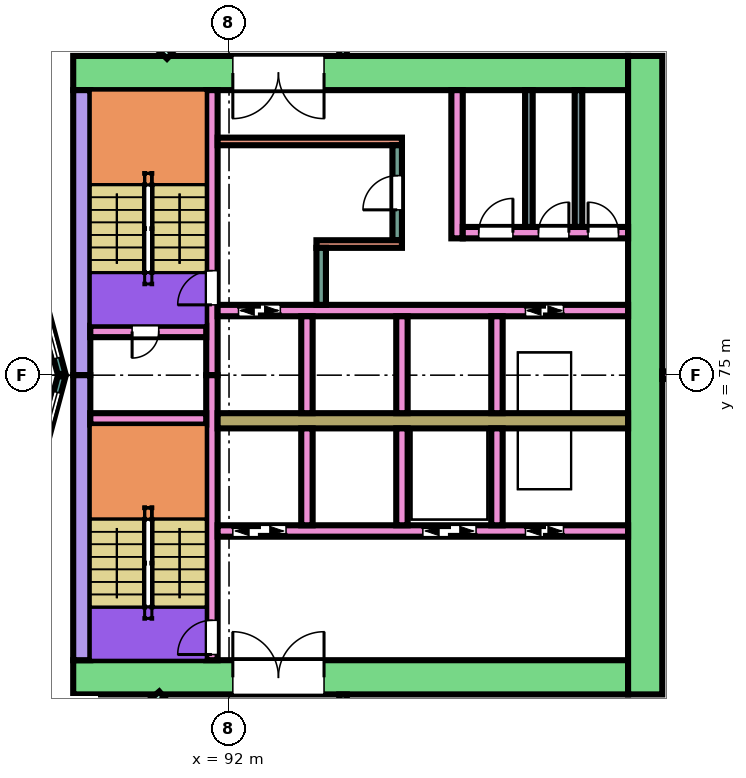
"""IFC4 building model, lengths in metres.
Left out: names, types, materials, properties, quantities, classifications, styles, units other than length and angle.
Written with IfcOpenShell. Run it as: python <this file> out.ifc"""

import sys

from ifc_helpers import new_model, si_unit, direction, frame, frame_2d, origin, place, context, subcontext, project, spatial, rectangle, extrude, element, fill, save


model = new_model("IFC4")
c1 = context("Model", 3, precision=1e-05, world=origin(), true_north=direction((0.0, 1.0)))
c2 = subcontext(c1, "Body", "Model", "MODEL_VIEW")
j1 = project(units=[si_unit("LENGTHUNIT", "METRE"), si_unit("PLANEANGLEUNIT", "RADIAN")], contexts=[c1])
p1 = place(None, origin())
s1 = spatial("IfcSite", under=j1, at=p1, CompositionType="ELEMENT")
p2 = place(p1, origin())
s2 = spatial("IfcBuilding", under=s1, at=p2, CompositionType="ELEMENT")
p3 = place(p2, frame((0.0, 0.0, 7.0)))
s3 = spatial("IfcBuildingStorey", under=s2, at=p3, CompositionType="ELEMENT", Elevation=7.0)
p4 = place(p3, frame((87.9, 82.95, 0.0), z_axis=(0.0, 0.0, 1.0), x_axis=(1.0, 0.0, 0.0)))
e1 = element("IfcWall", 1, at=p4, inside=s3, PredefinedType="SHEAR", context=c2, shape_type="SweptSolid", body=[
    extrude(rectangle(XDim=14.6, YDim=0.9, at=frame_2d((7.3, 0.0))), origin(), (0.0, 0.0, 1.0), 4.95),
])
p5 = place(p4, frame((4.2, 0.0, 0.0)))
e2 = element("IfcOpeningElement", 2, at=p5, cuts=e1, PredefinedType="OPENING", context=c2, shape_type="SweptSolid", body=[
    extrude(rectangle(XDim=2.4, YDim=2.4, at=frame_2d((1.2, 1.2))), frame((0.0, 0.46, 0.0), z_axis=(0.0, -1.0, 0.0), x_axis=(1.0, 0.0, 0.0)), (0.0, 0.0, 1.0), 0.92),
])
p6 = place(p3, frame((87.9, 67.05, 0.0), z_axis=(0.0, 0.0, 1.0), x_axis=(1.0, 0.0, 0.0)))
e3 = element("IfcWall", 3, at=p6, inside=s3, PredefinedType="SHEAR", context=c2, shape_type="SweptSolid", body=[
    extrude(rectangle(XDim=14.6, YDim=0.9, at=frame_2d((7.3, 0.0))), origin(), (0.0, 0.0, 1.0), 4.95),
])
p7 = place(p6, frame((4.2, 0.0, 0.0)))
e4 = element("IfcOpeningElement", 4, at=p7, cuts=e3, PredefinedType="OPENING", context=c2, shape_type="SweptSolid", body=[
    extrude(rectangle(XDim=2.4, YDim=2.4, at=frame_2d((1.2, 1.2))), frame((0.0, 0.46, 0.0), z_axis=(0.0, -1.0, 0.0), x_axis=(1.0, 0.0, 0.0)), (0.0, 0.0, 1.0), 0.92),
])
for number, where, z_axis, x_axis in (
    (5, (88.125, 75.0, 0.0), (0.0, 0.0, 1.0), (0.0, 1.0, 0.0)),
    (6, (88.125, 67.5, 0.0), (0.0, 0.0, 1.0), (0.0, 1.0, 0.0)),
):
    element("IfcWall", number, at=place(p3, frame(where, z_axis=z_axis, x_axis=x_axis)), inside=s3, PredefinedType="SHEAR", context=c2, shape_type="SweptSolid", body=[
        extrude(rectangle(XDim=7.5, YDim=0.45, at=frame_2d((3.75, 0.0))), origin(), (0.0, 0.0, 1.0), 4.95),
    ])
p8 = place(p3, frame((102.95, 66.6, 0.0), z_axis=(0.0, 0.0, 1.0), x_axis=(0.0, 1.0, 0.0)))
e7 = element("IfcWall", 7, at=p8, inside=s3, PredefinedType="SHEAR", context=c2, shape_type="SweptSolid", body=[
    extrude(rectangle(XDim=16.8, YDim=0.9, at=frame_2d((8.4, 0.0))), origin(), (0.0, 0.0, 1.0), 4.95),
])
p9 = place(p3, frame((91.55, 75.0, 0.0), z_axis=(0.0, 0.0, 1.0), x_axis=(0.0, 1.0, 0.0)))
e8 = element("IfcWall", 8, at=p9, inside=s3, PredefinedType="SHEAR", context=c2, shape_type="SweptSolid", body=[
    extrude(rectangle(XDim=7.5, YDim=0.3, at=frame_2d((3.75, 0.0))), origin(), (0.0, 0.0, 1.0), 4.95),
])
p10 = place(p9, frame((1.85, 0.0, 0.0)))
e9 = element("IfcOpeningElement", 9, at=p10, cuts=e8, PredefinedType="OPENING", context=c2, shape_type="SweptSolid", body=[
    extrude(rectangle(XDim=0.9, YDim=2.1, at=frame_2d((0.45, 1.05))), frame((0.0, 0.16, 0.0), z_axis=(0.0, -1.0, 0.0), x_axis=(1.0, 0.0, 0.0)), (0.0, 0.0, 1.0), 0.32),
])
p11 = place(p3, frame((91.55, 67.5, 0.0), z_axis=(0.0, 0.0, 1.0), x_axis=(0.0, 1.0, 0.0)))
e10 = element("IfcWall", 10, at=p11, inside=s3, PredefinedType="SHEAR", context=c2, shape_type="SweptSolid", body=[
    extrude(rectangle(XDim=7.5, YDim=0.3, at=frame_2d((3.75, 0.0))), origin(), (0.0, 0.0, 1.0), 4.95),
])
p12 = place(p11, frame((0.15, 0.0, 0.0)))
e11 = element("IfcOpeningElement", 11, at=p12, cuts=e10, PredefinedType="OPENING", context=c2, shape_type="SweptSolid", body=[
    extrude(rectangle(XDim=0.9, YDim=2.1, at=frame_2d((0.45, 1.05))), frame((0.0, 0.16, 0.0), z_axis=(0.0, -1.0, 0.0), x_axis=(1.0, 0.0, 0.0)), (0.0, 0.0, 1.0), 0.32),
])
p13 = place(p3, frame((88.35, 76.15, 0.0), z_axis=(0.0, 0.0, 1.0), x_axis=(1.0, 0.0, 0.0)))
e12 = element("IfcWall", 12, at=p13, inside=s3, PredefinedType="SHEAR", context=c2, shape_type="SweptSolid", body=[
    extrude(rectangle(XDim=3.05, YDim=0.3, at=frame_2d((1.525, 0.0))), origin(), (0.0, 0.0, 1.0), 4.95),
])
p14 = place(p13, frame((1.1, 0.0, 0.0)))
e13 = element("IfcOpeningElement", 13, at=p14, cuts=e12, PredefinedType="OPENING", context=c2, shape_type="SweptSolid", body=[
    extrude(rectangle(XDim=0.7, YDim=2.0, at=frame_2d((0.35, 1.0))), frame((0.0, 0.16, 0.0), z_axis=(0.0, -1.0, 0.0), x_axis=(1.0, 0.0, 0.0)), (0.0, 0.0, 1.0), 0.32),
])
p15 = place(p3, frame((88.35, 73.85, 0.0), z_axis=(0.0, 0.0, 1.0), x_axis=(1.0, 0.0, 0.0)))
e14 = element("IfcWall", 14, at=p15, inside=s3, PredefinedType="SHEAR", context=c2, shape_type="SweptSolid", body=[
    extrude(rectangle(XDim=3.05, YDim=0.3, at=frame_2d((1.525, 0.0))), origin(), (0.0, 0.0, 1.0), 4.95),
])
p16 = place(p3, frame((91.7, 76.7, 0.0), z_axis=(0.0, 0.0, 1.0), x_axis=(1.0, 0.0, 0.0)))
e15 = element("IfcWall", 15, at=p16, inside=s3, PredefinedType="SHEAR", context=c2, shape_type="SweptSolid", body=[
    extrude(rectangle(XDim=10.8, YDim=0.3, at=frame_2d((5.4, 0.0))), origin(), (0.0, 0.0, 1.0), 4.95),
])
p17 = place(p16, frame((0.55, 0.0, 0.0)))
e16 = element("IfcOpeningElement", 16, at=p17, cuts=e15, PredefinedType="OPENING", context=c2, shape_type="SweptSolid", body=[
    extrude(rectangle(XDim=1.1, YDim=2.1, at=frame_2d((0.55, 1.05))), frame((0.0, 0.16, 0.0), z_axis=(0.0, -1.0, 0.0), x_axis=(1.0, 0.0, 0.0)), (0.0, 0.0, 1.0), 0.32),
])
p18 = place(p16, frame((8.1, 0.0, 0.0)))
e17 = element("IfcOpeningElement", 17, at=p18, cuts=e15, PredefinedType="OPENING", context=c2, shape_type="SweptSolid", body=[
    extrude(rectangle(XDim=1.0, YDim=2.1, at=frame_2d((0.5, 1.05))), frame((0.0, 0.16, 0.0), z_axis=(0.0, -1.0, 0.0), x_axis=(1.0, 0.0, 0.0)), (0.0, 0.0, 1.0), 0.32),
])
p19 = place(p3, frame((91.7, 73.8, 0.0), z_axis=(0.0, 0.0, 1.0), x_axis=(1.0, 0.0, 0.0)))
e18 = element("IfcWall", 18, at=p19, inside=s3, PredefinedType="SHEAR", context=c2, shape_type="SweptSolid", body=[
    extrude(rectangle(XDim=10.8, YDim=0.4, at=frame_2d((5.4, 0.0))), origin(), (0.0, 0.0, 1.0), 4.95),
])
p20 = place(p3, frame((91.7, 70.9, 0.0), z_axis=(0.0, 0.0, 1.0), x_axis=(1.0, 0.0, 0.0)))
e19 = element("IfcWall", 19, at=p20, inside=s3, PredefinedType="SHEAR", context=c2, shape_type="SweptSolid", body=[
    extrude(rectangle(XDim=10.8, YDim=0.3, at=frame_2d((5.4, 0.0))), origin(), (0.0, 0.0, 1.0), 4.95),
])
p21 = place(p20, frame((0.4, 0.0, 0.0)))
e20 = element("IfcOpeningElement", 20, at=p21, cuts=e19, PredefinedType="OPENING", context=c2, shape_type="SweptSolid", body=[
    extrude(rectangle(XDim=1.4, YDim=2.1, at=frame_2d((0.7, 1.05))), frame((0.0, 0.16, 0.0), z_axis=(0.0, -1.0, 0.0), x_axis=(1.0, 0.0, 0.0)), (0.0, 0.0, 1.0), 0.32),
])
p22 = place(p20, frame((5.4, 0.0, 0.0)))
e21 = element("IfcOpeningElement", 21, at=p22, cuts=e19, PredefinedType="OPENING", context=c2, shape_type="SweptSolid", body=[
    extrude(rectangle(XDim=1.4, YDim=2.1, at=frame_2d((0.7, 1.05))), frame((0.0, 0.16, 0.0), z_axis=(0.0, -1.0, 0.0), x_axis=(1.0, 0.0, 0.0)), (0.0, 0.0, 1.0), 0.32),
])
p23 = place(p20, frame((8.1, 0.0, 0.0)))
e22 = element("IfcOpeningElement", 22, at=p23, cuts=e19, PredefinedType="OPENING", context=c2, shape_type="SweptSolid", body=[
    extrude(rectangle(XDim=1.0, YDim=2.1, at=frame_2d((0.5, 1.05))), frame((0.0, 0.16, 0.0), z_axis=(0.0, -1.0, 0.0), x_axis=(1.0, 0.0, 0.0)), (0.0, 0.0, 1.0), 0.32),
])
for number, where, z_axis, x_axis in (
    (23, (94.05, 74.0, 0.0), (0.0, 0.0, 1.0), (0.0, 1.0, 0.0)),
    (24, (96.55, 74.0, 0.0), (0.0, 0.0, 1.0), (0.0, 1.0, 0.0)),
    (25, (99.05, 74.0, 0.0), (0.0, 0.0, 1.0), (0.0, 1.0, 0.0)),
    (26, (94.05, 71.05, 0.0), (0.0, 0.0, 1.0), (0.0, 1.0, 0.0)),
    (27, (96.55, 71.05, 0.0), (0.0, 0.0, 1.0), (0.0, 1.0, 0.0)),
    (28, (99.05, 71.05, 0.0), (0.0, 0.0, 1.0), (0.0, 1.0, 0.0)),
):
    element("IfcWall", number, at=place(p3, frame(where, z_axis=z_axis, x_axis=x_axis)), inside=s3, PredefinedType="SHEAR", context=c2, shape_type="SweptSolid", body=[
        extrude(rectangle(XDim=2.55, YDim=0.3, at=frame_2d((1.275, 0.0))), origin(), (0.0, 0.0, 1.0), 4.95),
    ])
p24 = place(p3, frame((91.7, 81.15, 0.0), z_axis=(0.0, 0.0, 1.0), x_axis=(1.0, 0.0, 0.0)))
e29 = element("IfcWall", 29, at=p24, inside=s3, PredefinedType="SHEAR", context=c2, shape_type="SweptSolid", body=[
    extrude(rectangle(XDim=4.85, YDim=0.2, at=frame_2d((2.425, 0.0))), origin(), (0.0, 0.0, 1.0), 4.95),
])
p25 = place(p3, frame((96.425, 78.55, 0.0), z_axis=(0.0, 0.0, 1.0), x_axis=(0.0, 1.0, 0.0)))
e30 = element("IfcWall", 30, at=p25, inside=s3, PredefinedType="SHEAR", context=c2, shape_type="SweptSolid", body=[
    extrude(rectangle(XDim=2.5, YDim=0.25, at=frame_2d((1.25, 0.0))), origin(), (0.0, 0.0, 1.0), 4.95),
])
p26 = place(p25, frame((0.8, 0.0, 0.0)))
e31 = element("IfcOpeningElement", 31, at=p26, cuts=e30, PredefinedType="OPENING", context=c2, shape_type="SweptSolid", body=[
    extrude(rectangle(XDim=0.9, YDim=2.1, at=frame_2d((0.45, 1.05))), frame((0.0, 0.135, 0.0), z_axis=(0.0, -1.0, 0.0), x_axis=(1.0, 0.0, 0.0)), (0.0, 0.0, 1.0), 0.27),
])
p27 = place(p3, frame((94.3, 78.45, 0.0), z_axis=(0.0, 0.0, 1.0), x_axis=(1.0, 0.0, 0.0)))
e32 = element("IfcWall", 32, at=p27, inside=s3, PredefinedType="SHEAR", context=c2, shape_type="SweptSolid", body=[
    extrude(rectangle(XDim=2.25, YDim=0.2, at=frame_2d((1.125, 0.0))), origin(), (0.0, 0.0, 1.0), 4.95),
])
p28 = place(p3, frame((94.425, 76.85, 0.0), z_axis=(0.0, 0.0, 1.0), x_axis=(0.0, 1.0, 0.0)))
e33 = element("IfcWall", 33, at=p28, inside=s3, PredefinedType="SHEAR", context=c2, shape_type="SweptSolid", body=[
    extrude(rectangle(XDim=1.5, YDim=0.25, at=frame_2d((0.75, 0.0))), origin(), (0.0, 0.0, 1.0), 4.95),
])
p29 = place(p3, frame((98.0, 78.6, 0.0), z_axis=(0.0, 0.0, 1.0), x_axis=(0.0, 1.0, 0.0)))
e34 = element("IfcWall", 34, at=p29, inside=s3, PredefinedType="SHEAR", context=c2, shape_type="SweptSolid", body=[
    extrude(rectangle(XDim=3.9, YDim=0.3, at=frame_2d((1.95, 0.0))), origin(), (0.0, 0.0, 1.0), 4.95),
])
p30 = place(p3, frame((98.15, 78.75, 0.0), z_axis=(0.0, 0.0, 1.0), x_axis=(1.0, 0.0, 0.0)))
e35 = element("IfcWall", 35, at=p30, inside=s3, PredefinedType="SHEAR", context=c2, shape_type="SweptSolid", body=[
    extrude(rectangle(XDim=4.35, YDim=0.3, at=frame_2d((2.175, 0.0))), origin(), (0.0, 0.0, 1.0), 4.95),
])
p31 = place(p30, frame((0.42, 0.0, 0.0)))
e36 = element("IfcOpeningElement", 36, at=p31, cuts=e35, PredefinedType="OPENING", context=c2, shape_type="SweptSolid", body=[
    extrude(rectangle(XDim=0.9, YDim=2.1, at=frame_2d((0.45, 1.05))), frame((0.0, 0.16, 0.0), z_axis=(0.0, -1.0, 0.0), x_axis=(1.0, 0.0, 0.0)), (0.0, 0.0, 1.0), 0.32),
])
p32 = place(p30, frame((1.992, 0.0, 0.0)))
e37 = element("IfcOpeningElement", 37, at=p32, cuts=e35, PredefinedType="OPENING", context=c2, shape_type="SweptSolid", body=[
    extrude(rectangle(XDim=0.8, YDim=2.1, at=frame_2d((0.4, 1.05))), frame((0.0, 0.16, 0.0), z_axis=(0.0, -1.0, 0.0), x_axis=(1.0, 0.0, 0.0)), (0.0, 0.0, 1.0), 0.32),
])
p33 = place(p30, frame((3.298, 0.0, 0.0)))
e38 = element("IfcOpeningElement", 38, at=p33, cuts=e35, PredefinedType="OPENING", context=c2, shape_type="SweptSolid", body=[
    extrude(rectangle(XDim=0.8, YDim=2.1, at=frame_2d((0.4, 1.05))), frame((0.0, 0.16, 0.0), z_axis=(0.0, -1.0, 0.0), x_axis=(1.0, 0.0, 0.0)), (0.0, 0.0, 1.0), 0.32),
])
p34 = place(p3, frame((87.604, 75.0, 0.0), z_axis=(0.0, 0.0, 1.0), x_axis=(-0.258789828301, 0.965933654434, 0.0)))
e39 = element("IfcWall", 39, at=p34, inside=s3, PredefinedType="NOTDEFINED", context=c2, shape_type="SweptSolid", body=[
    extrude(rectangle(XDim=3.936, YDim=0.2, at=frame_2d((1.968, 0.0))), origin(), (0.0, 0.0, 1.0), 5.4),
])
p35 = place(p34, frame((0.468, 0.0, 0.9)))
e40 = element("IfcOpeningElement", 40, at=p35, cuts=e39, PredefinedType="OPENING", context=c2, shape_type="SweptSolid", body=[
    extrude(rectangle(XDim=3.0, YDim=2.3, at=frame_2d((1.5, 1.15))), frame((0.0, 0.11, 0.0), z_axis=(0.0, -1.0, 0.0), x_axis=(1.0, 0.0, 0.0)), (0.0, 0.0, 1.0), 0.22),
])
p36 = place(p3, frame((86.585, 71.198, 0.0), z_axis=(0.0, 0.0, 1.0), x_axis=(0.258789828301, 0.965933654434, 0.0)))
e41 = element("IfcWall", 41, at=p36, inside=s3, PredefinedType="NOTDEFINED", context=c2, shape_type="SweptSolid", body=[
    extrude(rectangle(XDim=3.936, YDim=0.2, at=frame_2d((1.968, 0.0))), origin(), (0.0, 0.0, 1.0), 5.4),
])
p37 = place(p36, frame((0.468, 0.0, 0.9)))
e42 = element("IfcOpeningElement", 42, at=p37, cuts=e41, PredefinedType="OPENING", context=c2, shape_type="SweptSolid", body=[
    extrude(rectangle(XDim=3.0, YDim=2.3, at=frame_2d((1.5, 1.15))), frame((0.0, 0.11, 0.0), z_axis=(0.0, -1.0, 0.0), x_axis=(1.0, 0.0, 0.0)), (0.0, 0.0, 1.0), 0.22),
])
p38 = place(p3, frame((86.685, 63.551, 0.0), z_axis=(0.0, 0.0, 1.0), x_axis=(0.758049900748, 0.652196556244, 0.0)))
e43 = element("IfcWall", 43, at=p38, inside=s3, PredefinedType="PARTITIONING", context=c2, shape_type="SweptSolid", body=[
    extrude(rectangle(XDim=4.675, YDim=0.2, at=frame_2d((2.337, 0.0))), origin(), (0.0, 0.0, 1.0), 4.95),
])
p39 = place(p38, frame((1.887, 0.0, 0.0)))
e44 = element("IfcOpeningElement", 44, at=p39, cuts=e43, PredefinedType="OPENING", context=c2, shape_type="SweptSolid", body=[
    extrude(rectangle(XDim=0.9, YDim=2.1, at=frame_2d((0.45, 1.05))), frame((0.0, 0.11, 0.0), z_axis=(0.0, -1.0, 0.0), x_axis=(1.0, 0.0, 0.0)), (0.0, 0.0, 1.0), 0.22),
])
p40 = place(p3, frame((86.861, 86.852, 0.0), z_axis=(0.0, 0.0, 1.0), x_axis=(0.719448855188, -0.694545423114, 0.0)))
e45 = element("IfcWall", 45, at=p40, inside=s3, PredefinedType="PARTITIONING", context=c2, shape_type="SweptSolid", body=[
    extrude(rectangle(XDim=4.97, YDim=0.2, at=frame_2d((2.485, 0.0))), origin(), (0.0, 0.0, 1.0), 4.95),
])
p41 = place(p40, frame((2.035, 0.0, 0.0)))
e46 = element("IfcOpeningElement", 46, at=p41, cuts=e45, PredefinedType="OPENING", context=c2, shape_type="SweptSolid", body=[
    extrude(rectangle(XDim=0.9, YDim=2.1, at=frame_2d((0.45, 1.05))), frame((0.0, 0.11, 0.0), z_axis=(0.0, -1.0, 0.0), x_axis=(1.0, 0.0, 0.0)), (0.0, 0.0, 1.0), 0.22),
])
for number, where, z_axis, x_axis in (
    (47, (95.0, 65.1, 0.0), (0.0, 0.0, 1.0), (0.0, 1.0, 0.0)),
    (48, (95.0, 83.401, 0.0), (0.0, 0.0, 1.0), (0.0, 1.0, 0.0)),
):
    element("IfcWall", number, at=place(p3, frame(where, z_axis=z_axis, x_axis=x_axis)), inside=s3, PredefinedType="PARTITIONING", context=c2, shape_type="SweptSolid", body=[
        extrude(rectangle(XDim=1.499, YDim=0.2, at=frame_2d((0.75, 0.0))), origin(), (0.0, 0.0, 1.0), 4.95),
    ])
p42 = place(p3, frame((103.401, 75.0, 0.0), z_axis=(0.0, 0.0, 1.0), x_axis=(1.0, 0.0, 0.0)))
e49 = element("IfcWall", 49, at=p42, inside=s3, PredefinedType="PARTITIONING", context=c2, shape_type="SweptSolid", body=[
    extrude(rectangle(XDim=17.396, YDim=0.2, at=frame_2d((8.698, 0.0))), origin(), (0.0, 0.0, 1.0), 3.35),
])
for number, where, z_axis, x_axis in (
    (50, (99.89, 78.9, 0.0), (0.0, 0.0, 1.0), (0.0, 1.0, 0.0)),
    (51, (101.195, 78.9, 0.0), (0.0, 0.0, 1.0), (0.0, 1.0, 0.0)),
):
    element("IfcWall", number, at=place(p3, frame(where, z_axis=z_axis, x_axis=x_axis)), inside=s3, PredefinedType="PARTITIONING", context=c2, shape_type="SweptSolid", body=[
        extrude(rectangle(XDim=3.6, YDim=0.2, at=frame_2d((1.8, 0.0))), origin(), (0.0, 0.0, 1.0), 4.95),
    ])
p43 = place(p35, origin())
e52 = element("IfcWindow", 52, at=p43, inside=s3, PartitioningType="SINGLE_PANEL", PredefinedType="WINDOW", context=c2, shape_type="SweptSolid", body=[
    extrude(rectangle(XDim=3.0, YDim=2.3, at=frame_2d((1.5, 1.15))), frame((0.0, 0.03, 0.0), z_axis=(0.0, -1.0, 0.0), x_axis=(1.0, 0.0, 0.0)), (0.0, 0.0, 1.0), 0.06),
])
fill(e40, e52)
p44 = place(p37, origin())
e53 = element("IfcWindow", 53, at=p44, inside=s3, PartitioningType="SINGLE_PANEL", PredefinedType="WINDOW", context=c2, shape_type="SweptSolid", body=[
    extrude(rectangle(XDim=3.0, YDim=2.3, at=frame_2d((1.5, 1.15))), frame((0.0, 0.03, 0.0), z_axis=(0.0, -1.0, 0.0), x_axis=(1.0, 0.0, 0.0)), (0.0, 0.0, 1.0), 0.06),
])
fill(e42, e53)
p45 = place(p14, frame((0.7, 0.0, 0.0), z_axis=(0.0, 0.0, 1.0), x_axis=(-1.0, 0.0, 0.0)))
e54 = element("IfcDoor", 54, at=p45, inside=s3, OperationType="SINGLE_SWING_RIGHT", PredefinedType="DOOR", context=c2, shape_type="SweptSolid", body=[
    extrude(rectangle(XDim=0.7, YDim=2.0, at=frame_2d((0.35, 1.0))), frame((0.0, 0.025, 0.0), z_axis=(0.0, -1.0, 0.0), x_axis=(1.0, 0.0, 0.0)), (0.0, 0.0, 1.0), 0.05),
])
fill(e13, e54)
p46 = place(p10, origin())
e55 = element("IfcDoor", 55, at=p46, inside=s3, OperationType="SINGLE_SWING_LEFT", PredefinedType="DOOR", context=c2, shape_type="SweptSolid", body=[
    extrude(rectangle(XDim=0.9, YDim=2.1, at=frame_2d((0.45, 1.05))), frame((0.0, 0.025, 0.0), z_axis=(0.0, -1.0, 0.0), x_axis=(1.0, 0.0, 0.0)), (0.0, 0.0, 1.0), 0.05),
])
fill(e9, e55)
p47 = place(p12, origin())
e56 = element("IfcDoor", 56, at=p47, inside=s3, OperationType="SINGLE_SWING_LEFT", PredefinedType="DOOR", context=c2, shape_type="SweptSolid", body=[
    extrude(rectangle(XDim=0.9, YDim=2.1, at=frame_2d((0.45, 1.05))), frame((0.0, 0.025, 0.0), z_axis=(0.0, -1.0, 0.0), x_axis=(1.0, 0.0, 0.0)), (0.0, 0.0, 1.0), 0.05),
])
fill(e11, e56)
p48 = place(p17, origin())
e57 = element("IfcDoor", 57, at=p48, inside=s3, OperationType="DOUBLE_DOOR_SLIDING", PredefinedType="DOOR", context=c2, shape_type="SweptSolid", body=[
    extrude(rectangle(XDim=1.1, YDim=2.1, at=frame_2d((0.55, 1.05))), frame((0.0, 0.025, 0.0), z_axis=(0.0, -1.0, 0.0), x_axis=(1.0, 0.0, 0.0)), (0.0, 0.0, 1.0), 0.05),
])
fill(e16, e57)
p49 = place(p18, origin())
e58 = element("IfcDoor", 58, at=p49, inside=s3, OperationType="DOUBLE_DOOR_SLIDING", PredefinedType="DOOR", context=c2, shape_type="SweptSolid", body=[
    extrude(rectangle(XDim=1.0, YDim=2.1, at=frame_2d((0.5, 1.05))), frame((0.0, 0.025, 0.0), z_axis=(0.0, -1.0, 0.0), x_axis=(1.0, 0.0, 0.0)), (0.0, 0.0, 1.0), 0.05),
])
fill(e17, e58)
p50 = place(p21, origin())
e59 = element("IfcDoor", 59, at=p50, inside=s3, OperationType="DOUBLE_DOOR_SLIDING", PredefinedType="DOOR", context=c2, shape_type="SweptSolid", body=[
    extrude(rectangle(XDim=1.4, YDim=2.1, at=frame_2d((0.7, 1.05))), frame((0.0, 0.025, 0.0), z_axis=(0.0, -1.0, 0.0), x_axis=(1.0, 0.0, 0.0)), (0.0, 0.0, 1.0), 0.05),
])
fill(e20, e59)
p51 = place(p22, origin())
e60 = element("IfcDoor", 60, at=p51, inside=s3, OperationType="DOUBLE_DOOR_SLIDING", PredefinedType="DOOR", context=c2, shape_type="SweptSolid", body=[
    extrude(rectangle(XDim=1.4, YDim=2.1, at=frame_2d((0.7, 1.05))), frame((0.0, 0.025, 0.0), z_axis=(0.0, -1.0, 0.0), x_axis=(1.0, 0.0, 0.0)), (0.0, 0.0, 1.0), 0.05),
])
fill(e21, e60)
p52 = place(p23, origin())
e61 = element("IfcDoor", 61, at=p52, inside=s3, OperationType="DOUBLE_DOOR_SLIDING", PredefinedType="DOOR", context=c2, shape_type="SweptSolid", body=[
    extrude(rectangle(XDim=1.0, YDim=2.1, at=frame_2d((0.5, 1.05))), frame((0.0, 0.025, 0.0), z_axis=(0.0, -1.0, 0.0), x_axis=(1.0, 0.0, 0.0)), (0.0, 0.0, 1.0), 0.05),
])
fill(e22, e61)
p53 = place(p26, origin())
e62 = element("IfcDoor", 62, at=p53, inside=s3, OperationType="SINGLE_SWING_LEFT", PredefinedType="DOOR", context=c2, shape_type="SweptSolid", body=[
    extrude(rectangle(XDim=0.9, YDim=2.1, at=frame_2d((0.45, 1.05))), frame((0.0, 0.025, 0.0), z_axis=(0.0, -1.0, 0.0), x_axis=(1.0, 0.0, 0.0)), (0.0, 0.0, 1.0), 0.05),
])
fill(e31, e62)
p54 = place(p31, origin())
e63 = element("IfcDoor", 63, at=p54, inside=s3, OperationType="SINGLE_SWING_RIGHT", PredefinedType="DOOR", context=c2, shape_type="SweptSolid", body=[
    extrude(rectangle(XDim=0.9, YDim=2.1, at=frame_2d((0.45, 1.05))), frame((0.0, 0.025, 0.0), z_axis=(0.0, -1.0, 0.0), x_axis=(1.0, 0.0, 0.0)), (0.0, 0.0, 1.0), 0.05),
])
fill(e36, e63)
p55 = place(p32, origin())
e64 = element("IfcDoor", 64, at=p55, inside=s3, OperationType="SINGLE_SWING_RIGHT", PredefinedType="DOOR", context=c2, shape_type="SweptSolid", body=[
    extrude(rectangle(XDim=0.8, YDim=2.1, at=frame_2d((0.4, 1.05))), frame((0.0, 0.025, 0.0), z_axis=(0.0, -1.0, 0.0), x_axis=(1.0, 0.0, 0.0)), (0.0, 0.0, 1.0), 0.05),
])
fill(e37, e64)
p56 = place(p33, origin())
e65 = element("IfcDoor", 65, at=p56, inside=s3, OperationType="SINGLE_SWING_LEFT", PredefinedType="DOOR", context=c2, shape_type="SweptSolid", body=[
    extrude(rectangle(XDim=0.8, YDim=2.1, at=frame_2d((0.4, 1.05))), frame((0.0, 0.025, 0.0), z_axis=(0.0, -1.0, 0.0), x_axis=(1.0, 0.0, 0.0)), (0.0, 0.0, 1.0), 0.05),
])
fill(e38, e65)
p57 = place(p5, frame((2.4, 0.0, 0.0), z_axis=(0.0, 0.0, 1.0), x_axis=(-1.0, 0.0, 0.0)))
e66 = element("IfcDoor", 66, at=p57, inside=s3, OperationType="DOUBLE_DOOR_SINGLE_SWING", PredefinedType="DOOR", context=c2, shape_type="SweptSolid", body=[
    extrude(rectangle(XDim=2.4, YDim=2.4, at=frame_2d((1.2, 1.2))), frame((0.0, 0.025, 0.0), z_axis=(0.0, -1.0, 0.0), x_axis=(1.0, 0.0, 0.0)), (0.0, 0.0, 1.0), 0.05),
])
fill(e2, e66)
p58 = place(p7, origin())
e67 = element("IfcDoor", 67, at=p58, inside=s3, OperationType="DOUBLE_DOOR_SINGLE_SWING", PredefinedType="DOOR", context=c2, shape_type="SweptSolid", body=[
    extrude(rectangle(XDim=2.4, YDim=2.4, at=frame_2d((1.2, 1.2))), frame((0.0, 0.025, 0.0), z_axis=(0.0, -1.0, 0.0), x_axis=(1.0, 0.0, 0.0)), (0.0, 0.0, 1.0), 0.05),
])
fill(e4, e67)
save(model, sys.argv[1])
